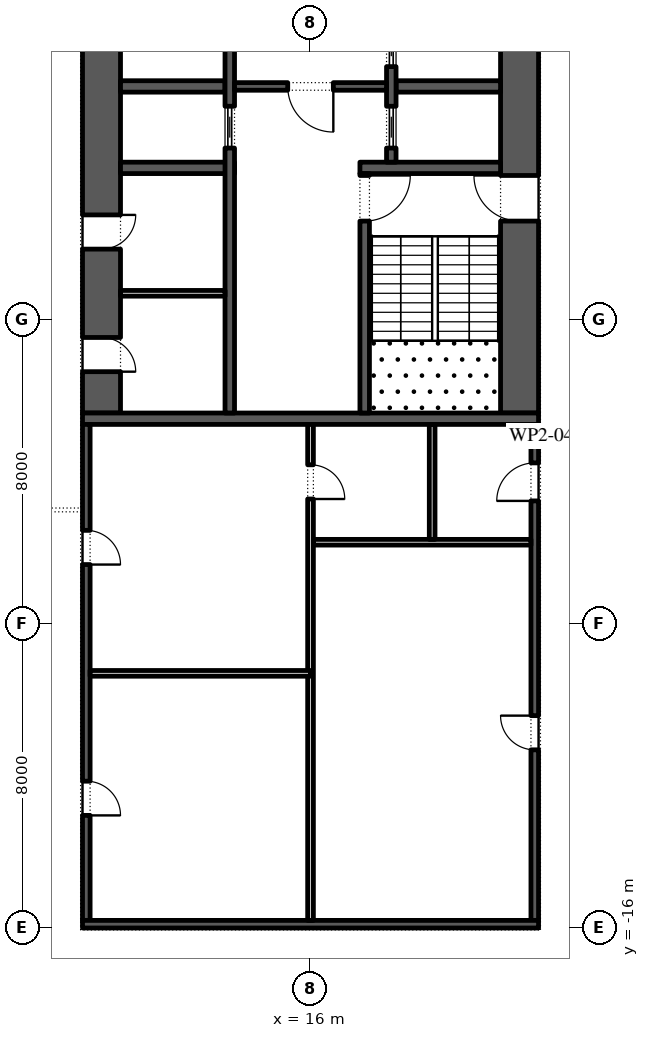
"""IFC4 building model, lengths in metres.
Left out: names, types, materials, properties, quantities, classifications, styles, units other than length and angle.
Written with IfcOpenShell. Run it as: python <this file> out.ifc"""

import sys

from ifc_helpers import new_model, si_unit, direction, frame, frame_2d, origin, place, context, subcontext, project, spatial, rectangle, extrude, element, fill, save


model = new_model("IFC4")
c1 = context("Model", 3, precision=1e-05, world=origin(), true_north=direction((0.0, 1.0)))
c2 = subcontext(c1, "Body", "Model", "MODEL_VIEW")
j1 = project(units=[si_unit("LENGTHUNIT", "METRE"), si_unit("PLANEANGLEUNIT", "RADIAN")], contexts=[c1])
p1 = place(None, origin())
s1 = spatial("IfcSite", under=j1, at=p1, CompositionType="ELEMENT")
p2 = place(p1, origin())
s2 = spatial("IfcBuilding", under=s1, at=p2, CompositionType="ELEMENT")
p3 = place(p2, frame((0.0, 0.0, 60.6)))
s3 = spatial("IfcBuildingStorey", under=s2, at=p3, CompositionType="ELEMENT", Elevation=60.6)
p4 = place(p3, frame((21.5, -2.45, 0.0), z_axis=(0.0, 0.0, 1.0), x_axis=(0.0, 1.0, 0.0)))
e1 = element("IfcWall", 1, at=p4, inside=s3, PredefinedType="SHEAR", context=c2, shape_type="SweptSolid", body=[
    extrude(rectangle(XDim=27.9, YDim=1.0, at=frame_2d((13.95, 0.0))), origin(), (0.0, 0.0, 1.0), 4.0),
])
p5 = place(p4, frame((5.05, 0.0, 0.0)))
e2 = element("IfcOpeningElement", 2, at=p5, cuts=e1, PredefinedType="OPENING", context=c2, shape_type="SweptSolid", body=[
    extrude(rectangle(XDim=1.2, YDim=2.1, at=frame_2d((0.6, 1.05))), frame((0.0, 0.51, 0.0), z_axis=(0.0, -1.0, 0.0), x_axis=(1.0, 0.0, 0.0)), (0.0, 0.0, 1.0), 1.02),
])
p6 = place(p4, frame((21.65, 0.0, 0.0)))
e3 = element("IfcOpeningElement", 3, at=p6, cuts=e1, PredefinedType="OPENING", context=c2, shape_type="SweptSolid", body=[
    extrude(rectangle(XDim=1.2, YDim=2.1, at=frame_2d((0.6, 1.05))), frame((0.0, 0.51, 0.0), z_axis=(0.0, -1.0, 0.0), x_axis=(1.0, 0.0, 0.0)), (0.0, 0.0, 1.0), 1.02),
])
p7 = place(p3, frame((10.5, -2.45, 0.0), z_axis=(0.0, 0.0, 1.0), x_axis=(0.0, 1.0, 0.0)))
e4 = element("IfcWall", 4, at=p7, inside=s3, PredefinedType="SHEAR", context=c2, shape_type="SweptSolid", body=[
    extrude(rectangle(XDim=27.9, YDim=1.0, at=frame_2d((13.95, 0.0))), origin(), (0.0, 0.0, 1.0), 4.0),
])
p8 = place(p7, frame((23.65, 0.0, 0.0)))
e5 = element("IfcOpeningElement", 5, at=p8, cuts=e4, PredefinedType="OPENING", context=c2, shape_type="SweptSolid", body=[
    extrude(rectangle(XDim=2.4, YDim=2.1, at=frame_2d((1.2, 1.05))), frame((0.0, 0.51, 0.0), z_axis=(0.0, -1.0, 0.0), x_axis=(1.0, 0.0, 0.0)), (0.0, 0.0, 1.0), 1.02),
])
p9 = place(p7, frame((1.087, 0.0, 0.0)))
e6 = element("IfcOpeningElement", 6, at=p9, cuts=e4, PredefinedType="OPENING", context=c2, shape_type="SweptSolid", body=[
    extrude(rectangle(XDim=0.9, YDim=2.1, at=frame_2d((0.45, 1.05))), frame((0.0, 0.51, 0.0), z_axis=(0.0, -1.0, 0.0), x_axis=(1.0, 0.0, 0.0)), (0.0, 0.0, 1.0), 1.02),
])
p10 = place(p7, frame((4.312, 0.0, 0.0)))
e7 = element("IfcOpeningElement", 7, at=p10, cuts=e4, PredefinedType="OPENING", context=c2, shape_type="SweptSolid", body=[
    extrude(rectangle(XDim=0.9, YDim=2.1, at=frame_2d((0.45, 1.05))), frame((0.0, 0.51, 0.0), z_axis=(0.0, -1.0, 0.0), x_axis=(1.0, 0.0, 0.0)), (0.0, 0.0, 1.0), 1.02),
])
p11 = place(p3, frame((10.0, -2.6, 0.0), z_axis=(0.0, 0.0, 1.0), x_axis=(1.0, 0.0, 0.0)))
e8 = element("IfcWall", 8, at=p11, inside=s3, PredefinedType="SHEAR", context=c2, shape_type="SweptSolid", body=[
    extrude(rectangle(XDim=12.0, YDim=0.3, at=frame_2d((6.0, 0.0))), origin(), (0.0, 0.0, 1.0), 4.0),
])
p12 = place(p3, frame((17.3, 4.0, 0.0), z_axis=(0.0, 0.0, 1.0), x_axis=(1.0, 0.0, 0.0)))
e9 = element("IfcWall", 9, at=p12, inside=s3, PredefinedType="SHEAR", context=c2, shape_type="SweptSolid", body=[
    extrude(rectangle(XDim=3.7, YDim=0.3, at=frame_2d((1.85, 0.0))), origin(), (0.0, 0.0, 1.0), 4.0),
])
p13 = place(p3, frame((17.425, -2.45, 0.0), z_axis=(0.0, 0.0, 1.0), x_axis=(0.0, 1.0, 0.0)))
e10 = element("IfcWall", 10, at=p13, inside=s3, PredefinedType="SHEAR", context=c2, shape_type="SweptSolid", body=[
    extrude(rectangle(XDim=6.3, YDim=0.25, at=frame_2d((3.15, 0.0))), origin(), (0.0, 0.0, 1.0), 4.0),
])
p14 = place(p13, frame((5.05, 0.0, 0.0)))
e11 = element("IfcOpeningElement", 11, at=p14, cuts=e10, PredefinedType="OPENING", context=c2, shape_type="SweptSolid", body=[
    extrude(rectangle(XDim=1.2, YDim=2.1, at=frame_2d((0.6, 1.05))), frame((0.0, 0.135, 0.0), z_axis=(0.0, -1.0, 0.0), x_axis=(1.0, 0.0, 0.0)), (0.0, 0.0, 1.0), 0.27),
])
p15 = place(p3, frame((18.25, 6.143, 0.0), z_axis=(0.0, 0.0, 1.0), x_axis=(1.0, 0.0, 0.0)))
e12 = element("IfcWall", 12, at=p15, inside=s3, PredefinedType="SHEAR", context=c2, shape_type="SweptSolid", body=[
    extrude(rectangle(XDim=2.75, YDim=0.3, at=frame_2d((1.375, 0.0))), origin(), (0.0, 0.0, 1.0), 4.0),
])
p16 = place(p3, frame((18.125, 4.15, 0.0), z_axis=(0.0, 0.0, 1.0), x_axis=(0.0, 1.0, 0.0)))
e13 = element("IfcWall", 13, at=p16, inside=s3, PredefinedType="SHEAR", context=c2, shape_type="SweptSolid", body=[
    extrude(rectangle(XDim=14.7, YDim=0.25, at=frame_2d((7.35, 0.0))), origin(), (0.0, 0.0, 1.0), 4.0),
])
p17 = place(p16, frame((0.371, 0.0, 0.0)))
e14 = element("IfcOpeningElement", 14, at=p17, cuts=e13, PredefinedType="OPENING", context=c2, shape_type="SweptSolid", body=[
    extrude(rectangle(XDim=1.1, YDim=2.1, at=frame_2d((0.55, 1.05))), frame((0.0, 0.135, 0.0), z_axis=(0.0, -1.0, 0.0), x_axis=(1.0, 0.0, 0.0)), (0.0, 0.0, 1.0), 0.27),
])
p18 = place(p16, frame((2.514, 0.0, 0.0)))
e15 = element("IfcOpeningElement", 15, at=p18, cuts=e13, PredefinedType="OPENING", context=c2, shape_type="SweptSolid", body=[
    extrude(rectangle(XDim=1.1, YDim=2.1, at=frame_2d((0.55, 1.05))), frame((0.0, 0.135, 0.0), z_axis=(0.0, -1.0, 0.0), x_axis=(1.0, 0.0, 0.0)), (0.0, 0.0, 1.0), 0.27),
])
p19 = place(p16, frame((4.657, 0.0, 0.0)))
e16 = element("IfcOpeningElement", 16, at=p19, cuts=e13, PredefinedType="OPENING", context=c2, shape_type="SweptSolid", body=[
    extrude(rectangle(XDim=1.1, YDim=2.1, at=frame_2d((0.55, 1.05))), frame((0.0, 0.135, 0.0), z_axis=(0.0, -1.0, 0.0), x_axis=(1.0, 0.0, 0.0)), (0.0, 0.0, 1.0), 0.27),
])
p20 = place(p16, frame((6.8, 0.0, 0.0)))
e17 = element("IfcOpeningElement", 17, at=p20, cuts=e13, PredefinedType="OPENING", context=c2, shape_type="SweptSolid", body=[
    extrude(rectangle(XDim=1.1, YDim=2.1, at=frame_2d((0.55, 1.05))), frame((0.0, 0.135, 0.0), z_axis=(0.0, -1.0, 0.0), x_axis=(1.0, 0.0, 0.0)), (0.0, 0.0, 1.0), 0.27),
])
p21 = place(p16, frame((8.943, 0.0, 0.0)))
e18 = element("IfcOpeningElement", 18, at=p21, cuts=e13, PredefinedType="OPENING", context=c2, shape_type="SweptSolid", body=[
    extrude(rectangle(XDim=1.1, YDim=2.1, at=frame_2d((0.55, 1.05))), frame((0.0, 0.135, 0.0), z_axis=(0.0, -1.0, 0.0), x_axis=(1.0, 0.0, 0.0)), (0.0, 0.0, 1.0), 0.27),
])
p22 = place(p16, frame((11.086, 0.0, 0.0)))
e19 = element("IfcOpeningElement", 19, at=p22, cuts=e13, PredefinedType="OPENING", context=c2, shape_type="SweptSolid", body=[
    extrude(rectangle(XDim=1.1, YDim=2.1, at=frame_2d((0.55, 1.05))), frame((0.0, 0.135, 0.0), z_axis=(0.0, -1.0, 0.0), x_axis=(1.0, 0.0, 0.0)), (0.0, 0.0, 1.0), 0.27),
])
p23 = place(p16, frame((13.229, 0.0, 0.0)))
e20 = element("IfcOpeningElement", 20, at=p23, cuts=e13, PredefinedType="OPENING", context=c2, shape_type="SweptSolid", body=[
    extrude(rectangle(XDim=1.1, YDim=2.1, at=frame_2d((0.55, 1.05))), frame((0.0, 0.135, 0.0), z_axis=(0.0, -1.0, 0.0), x_axis=(1.0, 0.0, 0.0)), (0.0, 0.0, 1.0), 0.27),
])
p24 = place(p3, frame((11.0, 4.0, 0.0), z_axis=(0.0, 0.0, 1.0), x_axis=(1.0, 0.0, 0.0)))
e21 = element("IfcWall", 21, at=p24, inside=s3, PredefinedType="SHEAR", context=c2, shape_type="SweptSolid", body=[
    extrude(rectangle(XDim=3.0, YDim=0.3, at=frame_2d((1.5, 0.0))), origin(), (0.0, 0.0, 1.0), 4.0),
])
p25 = place(p3, frame((11.0, 6.143, 0.0), z_axis=(0.0, 0.0, 1.0), x_axis=(1.0, 0.0, 0.0)))
e22 = element("IfcWall", 22, at=p25, inside=s3, PredefinedType="SHEAR", context=c2, shape_type="SweptSolid", body=[
    extrude(rectangle(XDim=2.75, YDim=0.3, at=frame_2d((1.375, 0.0))), origin(), (0.0, 0.0, 1.0), 4.0),
])
p26 = place(p3, frame((13.875, -2.45, 0.0), z_axis=(0.0, 0.0, 1.0), x_axis=(0.0, 1.0, 0.0)))
e23 = element("IfcWall", 23, at=p26, inside=s3, PredefinedType="SHEAR", context=c2, shape_type="SweptSolid", body=[
    extrude(rectangle(XDim=21.3, YDim=0.25, at=frame_2d((10.65, 0.0))), origin(), (0.0, 0.0, 1.0), 4.0),
])
p27 = place(p26, frame((14.571, 0.0, 0.0)))
e24 = element("IfcOpeningElement", 24, at=p27, cuts=e23, PredefinedType="OPENING", context=c2, shape_type="SweptSolid", body=[
    extrude(rectangle(XDim=0.9, YDim=2.1, at=frame_2d((0.45, 1.05))), frame((0.0, 0.135, 0.0), z_axis=(0.0, -1.0, 0.0), x_axis=(1.0, 0.0, 0.0)), (0.0, 0.0, 1.0), 0.27),
])
p28 = place(p26, frame((6.971, 0.0, 0.0)))
e25 = element("IfcOpeningElement", 25, at=p28, cuts=e23, PredefinedType="OPENING", context=c2, shape_type="SweptSolid", body=[
    extrude(rectangle(XDim=1.1, YDim=2.1, at=frame_2d((0.55, 1.05))), frame((0.0, 0.135, 0.0), z_axis=(0.0, -1.0, 0.0), x_axis=(1.0, 0.0, 0.0)), (0.0, 0.0, 1.0), 0.27),
])
p29 = place(p3, frame((14.0, 6.143, 0.0), z_axis=(0.0, 0.0, 1.0), x_axis=(1.0, 0.0, 0.0)))
e26 = element("IfcWall", 26, at=p29, inside=s3, PredefinedType="SHEAR", context=c2, shape_type="SweptSolid", body=[
    extrude(rectangle(XDim=4.0, YDim=0.2, at=frame_2d((2.0, 0.0))), origin(), (0.0, 0.0, 1.0), 4.0),
])
p30 = place(p29, frame((1.4, 0.0, 0.0)))
e27 = element("IfcOpeningElement", 27, at=p30, cuts=e26, PredefinedType="OPENING", context=c2, shape_type="SweptSolid", body=[
    extrude(rectangle(XDim=1.2, YDim=2.1, at=frame_2d((0.6, 1.05))), frame((0.0, 0.11, 0.0), z_axis=(0.0, -1.0, 0.0), x_axis=(1.0, 0.0, 0.0)), (0.0, 0.0, 1.0), 0.22),
])
p31 = place(p3, frame((11.0, 0.7, 0.0), z_axis=(0.0, 0.0, 1.0), x_axis=(1.0, 0.0, 0.0)))
e28 = element("IfcWall", 28, at=p31, inside=s3, PredefinedType="PARTITIONING", context=c2, shape_type="SweptSolid", body=[
    extrude(rectangle(XDim=2.75, YDim=0.15, at=frame_2d((1.375, 0.0))), origin(), (0.0, 0.0, 1.0), 4.0),
])
p32 = place(p3, frame((21.9, -15.8, 0.0), z_axis=(0.0, 0.0, 1.0), x_axis=(0.0, 1.0, 0.0)))
e29 = element("IfcWall", 29, at=p32, inside=s3, PredefinedType="SHEAR", context=c2, shape_type="SweptSolid", body=[
    extrude(rectangle(XDim=13.05, YDim=0.2, at=frame_2d((6.525, 0.0))), origin(), (0.0, 0.0, 1.0), 4.0),
])
p33 = place(p32, frame((4.488, 0.0, 0.0)))
e30 = element("IfcOpeningElement", 30, at=p33, cuts=e29, PredefinedType="OPENING", context=c2, shape_type="SweptSolid", body=[
    extrude(rectangle(XDim=0.9, YDim=2.1, at=frame_2d((0.45, 1.05))), frame((0.0, 0.11, 0.0), z_axis=(0.0, -1.0, 0.0), x_axis=(1.0, 0.0, 0.0)), (0.0, 0.0, 1.0), 0.22),
])
p34 = place(p32, frame((11.038, 0.0, 0.0)))
e31 = element("IfcOpeningElement", 31, at=p34, cuts=e29, PredefinedType="OPENING", context=c2, shape_type="SweptSolid", body=[
    extrude(rectangle(XDim=1.0, YDim=2.1, at=frame_2d((0.5, 1.05))), frame((0.0, 0.11, 0.0), z_axis=(0.0, -1.0, 0.0), x_axis=(1.0, 0.0, 0.0)), (0.0, 0.0, 1.0), 0.22),
])
p35 = place(p3, frame((10.1, -15.8, 0.0), z_axis=(0.0, 0.0, 1.0), x_axis=(0.0, 1.0, 0.0)))
e32 = element("IfcWall", 32, at=p35, inside=s3, PredefinedType="SHEAR", context=c2, shape_type="SweptSolid", body=[
    extrude(rectangle(XDim=13.05, YDim=0.2, at=frame_2d((6.525, 0.0))), origin(), (0.0, 0.0, 1.0), 4.0),
])
p36 = place(p35, frame((2.762, 0.0, 0.0)))
e33 = element("IfcOpeningElement", 33, at=p36, cuts=e32, PredefinedType="OPENING", context=c2, shape_type="SweptSolid", body=[
    extrude(rectangle(XDim=0.9, YDim=2.1, at=frame_2d((0.45, 1.05))), frame((0.0, 0.11, 0.0), z_axis=(0.0, -1.0, 0.0), x_axis=(1.0, 0.0, 0.0)), (0.0, 0.0, 1.0), 0.22),
])
p37 = place(p35, frame((9.363, 0.0, 0.0)))
e34 = element("IfcOpeningElement", 34, at=p37, cuts=e32, PredefinedType="OPENING", context=c2, shape_type="SweptSolid", body=[
    extrude(rectangle(XDim=0.9, YDim=2.1, at=frame_2d((0.45, 1.05))), frame((0.0, 0.11, 0.0), z_axis=(0.0, -1.0, 0.0), x_axis=(1.0, 0.0, 0.0)), (0.0, 0.0, 1.0), 0.22),
])
p38 = place(p3, frame((10.0, -15.9, 0.0), z_axis=(0.0, 0.0, 1.0), x_axis=(1.0, 0.0, 0.0)))
e35 = element("IfcWall", 35, at=p38, inside=s3, PredefinedType="SHEAR", context=c2, shape_type="SweptSolid", body=[
    extrude(rectangle(XDim=12.0, YDim=0.2, at=frame_2d((6.0, 0.0))), origin(), (0.0, 0.0, 1.0), 4.0),
])
p39 = place(p3, frame((16.0, -15.8, 0.0), z_axis=(0.0, 0.0, 1.0), x_axis=(0.0, 1.0, 0.0)))
e36 = element("IfcWall", 36, at=p39, inside=s3, PredefinedType="PARTITIONING", context=c2, shape_type="SweptSolid", body=[
    extrude(rectangle(XDim=13.05, YDim=0.15, at=frame_2d((6.525, 0.0))), origin(), (0.0, 0.0, 1.0), 4.0),
])
p40 = place(p39, frame((11.087, 0.0, 0.0)))
e37 = element("IfcOpeningElement", 37, at=p40, cuts=e36, PredefinedType="OPENING", context=c2, shape_type="SweptSolid", body=[
    extrude(rectangle(XDim=0.9, YDim=2.1, at=frame_2d((0.45, 1.05))), frame((0.0, 0.085, 0.0), z_axis=(0.0, -1.0, 0.0), x_axis=(1.0, 0.0, 0.0)), (0.0, 0.0, 1.0), 0.17),
])
p41 = place(p3, frame((10.2, -9.3, 0.0), z_axis=(0.0, 0.0, 1.0), x_axis=(1.0, 0.0, 0.0)))
e38 = element("IfcWall", 38, at=p41, inside=s3, PredefinedType="PARTITIONING", context=c2, shape_type="SweptSolid", body=[
    extrude(rectangle(XDim=5.8, YDim=0.15, at=frame_2d((2.9, 0.0))), origin(), (0.0, 0.0, 1.0), 4.0),
])
p42 = place(p3, frame((16.075, -5.85, 0.0), z_axis=(0.0, 0.0, 1.0), x_axis=(1.0, 0.0, 0.0)))
e39 = element("IfcWall", 39, at=p42, inside=s3, PredefinedType="PARTITIONING", context=c2, shape_type="SweptSolid", body=[
    extrude(rectangle(XDim=5.725, YDim=0.15, at=frame_2d((2.863, 0.0))), origin(), (0.0, 0.0, 1.0), 4.0),
])
p43 = place(p3, frame((19.2, -5.775, 0.0), z_axis=(0.0, 0.0, 1.0), x_axis=(0.0, 1.0, 0.0)))
e40 = element("IfcWall", 40, at=p43, inside=s3, PredefinedType="PARTITIONING", context=c2, shape_type="SweptSolid", body=[
    extrude(rectangle(XDim=3.025, YDim=0.15, at=frame_2d((1.512, 0.0))), origin(), (0.0, 0.0, 1.0), 4.0),
])
p44 = place(p17, origin())
e41 = element("IfcDoor", 41, at=p44, inside=s3, OperationType="SLIDING_TO_LEFT", PredefinedType="DOOR", context=c2, shape_type="SweptSolid", body=[
    extrude(rectangle(XDim=1.1, YDim=2.1, at=frame_2d((0.55, 1.05))), frame((0.0, 0.025, 0.0), z_axis=(0.0, -1.0, 0.0), x_axis=(1.0, 0.0, 0.0)), (0.0, 0.0, 1.0), 0.05),
])
fill(e14, e41)
p45 = place(p18, origin())
e42 = element("IfcDoor", 42, at=p45, inside=s3, OperationType="SLIDING_TO_LEFT", PredefinedType="DOOR", context=c2, shape_type="SweptSolid", body=[
    extrude(rectangle(XDim=1.1, YDim=2.1, at=frame_2d((0.55, 1.05))), frame((0.0, 0.025, 0.0), z_axis=(0.0, -1.0, 0.0), x_axis=(1.0, 0.0, 0.0)), (0.0, 0.0, 1.0), 0.05),
])
fill(e15, e42)
p46 = place(p28, origin())
e43 = element("IfcDoor", 43, at=p46, inside=s3, OperationType="SLIDING_TO_LEFT", PredefinedType="DOOR", context=c2, shape_type="SweptSolid", body=[
    extrude(rectangle(XDim=1.1, YDim=2.1, at=frame_2d((0.55, 1.05))), frame((0.0, 0.025, 0.0), z_axis=(0.0, -1.0, 0.0), x_axis=(1.0, 0.0, 0.0)), (0.0, 0.0, 1.0), 0.05),
])
fill(e25, e43)
p47 = place(p30, frame((1.2, 0.0, 0.0), z_axis=(0.0, 0.0, 1.0), x_axis=(-1.0, 0.0, 0.0)))
e44 = element("IfcDoor", 44, at=p47, inside=s3, OperationType="SINGLE_SWING_RIGHT", PredefinedType="DOOR", context=c2, shape_type="SweptSolid", body=[
    extrude(rectangle(XDim=1.2, YDim=2.1, at=frame_2d((0.6, 1.05))), frame((0.0, 0.025, 0.0), z_axis=(0.0, -1.0, 0.0), x_axis=(1.0, 0.0, 0.0)), (0.0, 0.0, 1.0), 0.05),
])
fill(e27, e44)
p48 = place(p14, frame((1.2, 0.0, 0.0), z_axis=(0.0, 0.0, 1.0), x_axis=(-1.0, 0.0, 0.0)))
e45 = element("IfcDoor", 45, at=p48, inside=s3, OperationType="SINGLE_SWING_RIGHT", PredefinedType="DOOR", context=c2, shape_type="SweptSolid", body=[
    extrude(rectangle(XDim=1.2, YDim=2.1, at=frame_2d((0.6, 1.05))), frame((0.0, 0.025, 0.0), z_axis=(0.0, -1.0, 0.0), x_axis=(1.0, 0.0, 0.0)), (0.0, 0.0, 1.0), 0.05),
])
fill(e11, e45)
p49 = place(p5, origin())
e46 = element("IfcDoor", 46, at=p49, inside=s3, OperationType="SINGLE_SWING_LEFT", PredefinedType="DOOR", context=c2, shape_type="SweptSolid", body=[
    extrude(rectangle(XDim=1.2, YDim=2.1, at=frame_2d((0.6, 1.05))), frame((0.0, 0.025, 0.0), z_axis=(0.0, -1.0, 0.0), x_axis=(1.0, 0.0, 0.0)), (0.0, 0.0, 1.0), 0.05),
])
fill(e2, e46)
p50 = place(p9, frame((0.9, -0.95, 0.0), z_axis=(0.0, 0.0, 1.0), x_axis=(-1.0, 0.0, 0.0)))
e47 = element("IfcDoor", 47, at=p50, inside=s3, OperationType="SINGLE_SWING_LEFT", PredefinedType="DOOR", context=c2, shape_type="SweptSolid", body=[
    extrude(rectangle(XDim=0.9, YDim=2.1, at=frame_2d((0.45, 1.05))), frame((0.0, -0.45, 0.0), z_axis=(0.0, -1.0, 0.0), x_axis=(1.0, 0.0, 0.0)), (0.0, 0.0, 1.0), 0.05),
])
fill(e6, e47)
p51 = place(p10, frame((0.9, -0.95, 0.0), z_axis=(0.0, 0.0, 1.0), x_axis=(-1.0, 0.0, 0.0)))
e48 = element("IfcDoor", 48, at=p51, inside=s3, OperationType="SINGLE_SWING_RIGHT", PredefinedType="DOOR", context=c2, shape_type="SweptSolid", body=[
    extrude(rectangle(XDim=0.9, YDim=2.1, at=frame_2d((0.45, 1.05))), frame((0.0, -0.45, 0.0), z_axis=(0.0, -1.0, 0.0), x_axis=(1.0, 0.0, 0.0)), (0.0, 0.0, 1.0), 0.05),
])
fill(e7, e48)
p52 = place(p33, origin())
e49 = element("IfcDoor", 49, at=p52, inside=s3, OperationType="SINGLE_SWING_LEFT", PredefinedType="DOOR", context=c2, shape_type="SweptSolid", body=[
    extrude(rectangle(XDim=0.9, YDim=2.1, at=frame_2d((0.45, 1.05))), frame((0.0, 0.1, 0.0), z_axis=(0.0, -1.0, 0.0), x_axis=(1.0, 0.0, 0.0)), (0.0, 0.0, 1.0), 0.05),
])
fill(e30, e49)
p53 = place(p34, origin())
e50 = element("IfcDoor", 50, at=p53, inside=s3, OperationType="SINGLE_SWING_RIGHT", PredefinedType="DOOR", context=c2, shape_type="SweptSolid", body=[
    extrude(rectangle(XDim=1.0, YDim=2.1, at=frame_2d((0.5, 1.05))), frame((0.0, 0.1, 0.0), z_axis=(0.0, -1.0, 0.0), x_axis=(1.0, 0.0, 0.0)), (0.0, 0.0, 1.0), 0.05),
])
fill(e31, e50)
p54 = place(p40, frame((0.9, 0.0, 0.0), z_axis=(0.0, 0.0, 1.0), x_axis=(-1.0, 0.0, 0.0)))
e51 = element("IfcDoor", 51, at=p54, inside=s3, OperationType="SINGLE_SWING_LEFT", PredefinedType="DOOR", context=c2, shape_type="SweptSolid", body=[
    extrude(rectangle(XDim=0.9, YDim=2.1, at=frame_2d((0.45, 1.05))), frame((0.0, 0.025, 0.0), z_axis=(0.0, -1.0, 0.0), x_axis=(1.0, 0.0, 0.0)), (0.0, 0.0, 1.0), 0.05),
])
fill(e37, e51)
p55 = place(p36, frame((0.9, -0.15, 0.0), z_axis=(0.0, 0.0, 1.0), x_axis=(-1.0, 0.0, 0.0)))
e52 = element("IfcDoor", 52, at=p55, inside=s3, OperationType="SINGLE_SWING_LEFT", PredefinedType="DOOR", context=c2, shape_type="SweptSolid", body=[
    extrude(rectangle(XDim=0.9, YDim=2.1, at=frame_2d((0.45, 1.05))), frame((0.0, -0.05, 0.0), z_axis=(0.0, -1.0, 0.0), x_axis=(1.0, 0.0, 0.0)), (0.0, 0.0, 1.0), 0.05),
])
fill(e33, e52)
p56 = place(p37, frame((0.9, -0.15, 0.0), z_axis=(0.0, 0.0, 1.0), x_axis=(-1.0, 0.0, 0.0)))
e53 = element("IfcDoor", 53, at=p56, inside=s3, OperationType="SINGLE_SWING_LEFT", PredefinedType="DOOR", context=c2, shape_type="SweptSolid", body=[
    extrude(rectangle(XDim=0.9, YDim=2.1, at=frame_2d((0.45, 1.05))), frame((0.0, -0.05, 0.0), z_axis=(0.0, -1.0, 0.0), x_axis=(1.0, 0.0, 0.0)), (0.0, 0.0, 1.0), 0.05),
])
fill(e34, e53)
save(model, sys.argv[1])
